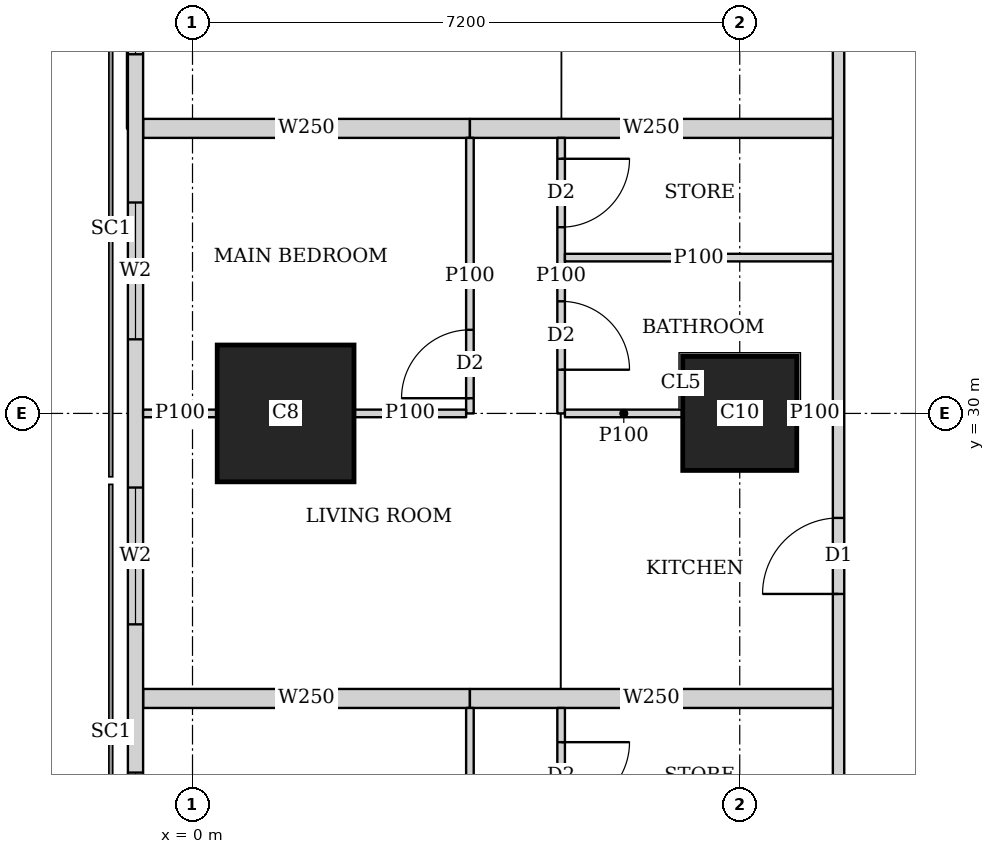
"""IFC4 building model, lengths in metres.
Left out: names, types, materials, properties, quantities, classifications, styles, units other than length and angle.
Written with IfcOpenShell. Run it as: python <this file> out.ifc"""

import sys

from ifc_helpers import new_model, si_unit, direction, frame, frame_2d, origin, origin_2d, place, context, subcontext, project, spatial, rectangle, extrude, element, fill, save


model = new_model("IFC4")
c1 = context("Model", 3, precision=1e-05, world=origin(), true_north=direction((0.0, 1.0)))
c2 = subcontext(c1, "Body", "Model", "MODEL_VIEW")
j1 = project(units=[si_unit("LENGTHUNIT", "METRE"), si_unit("PLANEANGLEUNIT", "RADIAN")], contexts=[c1])
p1 = place(None, origin())
s1 = spatial("IfcSite", under=j1, at=p1, CompositionType="ELEMENT")
p2 = place(p1, origin())
s2 = spatial("IfcBuilding", under=s1, at=p2, CompositionType="ELEMENT")
p3 = place(p2, frame((0.0, 0.0, 139.55)))
s3 = spatial("IfcBuildingStorey", under=s2, at=p3, CompositionType="ELEMENT", Elevation=139.55)
p4 = place(p3, frame((1.225, 30.0, 0.0), z_axis=(0.0, 0.0, 1.0), x_axis=(1.0, 0.0, 0.0)))
e1 = element("IfcColumn", 1, at=p4, inside=s3, PredefinedType="COLUMN", context=c2, shape_type="SweptSolid", body=[
    extrude(rectangle(XDim=1.8, YDim=1.8, at=origin_2d()), origin(), (0.0, 0.0, 1.0), 3.75),
])
p5 = place(p3, frame((7.2, 30.0, 0.0), z_axis=(0.0, 0.0, 1.0), x_axis=(1.0, 0.0, 0.0)))
e2 = element("IfcColumn", 2, at=p5, inside=s3, PredefinedType="COLUMN", context=c2, shape_type="SweptSolid", body=[
    extrude(rectangle(XDim=1.5, YDim=1.5, at=origin_2d()), origin(), (0.0, 0.0, 1.0), 3.75),
])
p6 = place(p3, frame((-0.75, 42.837, 0.0), z_axis=(0.0, 0.0, 1.0), x_axis=(0.0, -1.0, 0.0)))
e3 = element("IfcWall", 3, at=p6, inside=s3, PredefinedType="SOLIDWALL", context=c2, shape_type="SweptSolid", body=[
    extrude(rectangle(XDim=40.674, YDim=0.2, at=frame_2d((20.337, 0.0))), origin(), (0.0, 0.0, 1.0), 3.5),
])
p7 = place(p6, frame((1.78, 0.0, 0.9)))
e4 = element("IfcOpeningElement", 4, at=p7, cuts=e3, PredefinedType="OPENING", context=c2, shape_type="SweptSolid", body=[
    extrude(rectangle(XDim=1.8, YDim=1.5, at=frame_2d((0.9, 0.75))), frame((0.0, 0.11, 0.0), z_axis=(0.0, -1.0, 0.0), x_axis=(1.0, 0.0, 0.0)), (0.0, 0.0, 1.0), 0.22),
])
p8 = place(p6, frame((6.312, 0.0, 0.9)))
e5 = element("IfcOpeningElement", 5, at=p8, cuts=e3, PredefinedType="OPENING", context=c2, shape_type="SweptSolid", body=[
    extrude(rectangle(XDim=1.8, YDim=1.5, at=frame_2d((0.9, 0.75))), frame((0.0, 0.11, 0.0), z_axis=(0.0, -1.0, 0.0), x_axis=(1.0, 0.0, 0.0)), (0.0, 0.0, 1.0), 0.22),
])
p9 = place(p6, frame((10.062, 0.0, 0.9)))
e6 = element("IfcOpeningElement", 6, at=p9, cuts=e3, PredefinedType="OPENING", context=c2, shape_type="SweptSolid", body=[
    extrude(rectangle(XDim=1.8, YDim=1.5, at=frame_2d((0.9, 0.75))), frame((0.0, 0.11, 0.0), z_axis=(0.0, -1.0, 0.0), x_axis=(1.0, 0.0, 0.0)), (0.0, 0.0, 1.0), 0.22),
])
p10 = place(p6, frame((13.812, 0.0, 0.9)))
e7 = element("IfcOpeningElement", 7, at=p10, cuts=e3, PredefinedType="OPENING", context=c2, shape_type="SweptSolid", body=[
    extrude(rectangle(XDim=1.8, YDim=1.5, at=frame_2d((0.9, 0.75))), frame((0.0, 0.11, 0.0), z_axis=(0.0, -1.0, 0.0), x_axis=(1.0, 0.0, 0.0)), (0.0, 0.0, 1.0), 0.22),
])
p11 = place(p6, frame((17.562, 0.0, 0.9)))
e8 = element("IfcOpeningElement", 8, at=p11, cuts=e3, PredefinedType="OPENING", context=c2, shape_type="SweptSolid", body=[
    extrude(rectangle(XDim=1.8, YDim=1.5, at=frame_2d((0.9, 0.75))), frame((0.0, 0.11, 0.0), z_axis=(0.0, -1.0, 0.0), x_axis=(1.0, 0.0, 0.0)), (0.0, 0.0, 1.0), 0.22),
])
p12 = place(p6, frame((21.312, 0.0, 0.9)))
e9 = element("IfcOpeningElement", 9, at=p12, cuts=e3, PredefinedType="OPENING", context=c2, shape_type="SweptSolid", body=[
    extrude(rectangle(XDim=1.8, YDim=1.5, at=frame_2d((0.9, 0.75))), frame((0.0, 0.11, 0.0), z_axis=(0.0, -1.0, 0.0), x_axis=(1.0, 0.0, 0.0)), (0.0, 0.0, 1.0), 0.22),
])
p13 = place(p6, frame((25.062, 0.0, 0.9)))
e10 = element("IfcOpeningElement", 10, at=p13, cuts=e3, PredefinedType="OPENING", context=c2, shape_type="SweptSolid", body=[
    extrude(rectangle(XDim=1.8, YDim=1.5, at=frame_2d((0.9, 0.75))), frame((0.0, 0.11, 0.0), z_axis=(0.0, -1.0, 0.0), x_axis=(1.0, 0.0, 0.0)), (0.0, 0.0, 1.0), 0.22),
])
p14 = place(p6, frame((28.812, 0.0, 0.9)))
e11 = element("IfcOpeningElement", 11, at=p14, cuts=e3, PredefinedType="OPENING", context=c2, shape_type="SweptSolid", body=[
    extrude(rectangle(XDim=1.8, YDim=1.5, at=frame_2d((0.9, 0.75))), frame((0.0, 0.11, 0.0), z_axis=(0.0, -1.0, 0.0), x_axis=(1.0, 0.0, 0.0)), (0.0, 0.0, 1.0), 0.22),
])
p15 = place(p6, frame((32.562, 0.0, 0.9)))
e12 = element("IfcOpeningElement", 12, at=p15, cuts=e3, PredefinedType="OPENING", context=c2, shape_type="SweptSolid", body=[
    extrude(rectangle(XDim=1.8, YDim=1.5, at=frame_2d((0.9, 0.75))), frame((0.0, 0.11, 0.0), z_axis=(0.0, -1.0, 0.0), x_axis=(1.0, 0.0, 0.0)), (0.0, 0.0, 1.0), 0.22),
])
p16 = place(p6, frame((37.094, 0.0, 0.9)))
e13 = element("IfcOpeningElement", 13, at=p16, cuts=e3, PredefinedType="OPENING", context=c2, shape_type="SweptSolid", body=[
    extrude(rectangle(XDim=1.8, YDim=1.5, at=frame_2d((0.9, 0.75))), frame((0.0, 0.11, 0.0), z_axis=(0.0, -1.0, 0.0), x_axis=(1.0, 0.0, 0.0)), (0.0, 0.0, 1.0), 0.22),
])
p17 = place(p3, frame((8.5, 1.964, 0.0), z_axis=(0.0, 0.0, 1.0), x_axis=(0.0, 1.0, 0.0)))
e14 = element("IfcWall", 14, at=p17, inside=s3, PredefinedType="SOLIDWALL", context=c2, shape_type="SweptSolid", body=[
    extrude(rectangle(XDim=41.097, YDim=0.15, at=frame_2d((20.548, 0.0))), origin(), (0.0, 0.0, 1.0), 3.5),
])
p18 = place(p17, frame((6.911, 0.0, 0.0)))
e15 = element("IfcOpeningElement", 15, at=p18, cuts=e14, PredefinedType="OPENING", context=c2, shape_type="SweptSolid", body=[
    extrude(rectangle(XDim=1.0, YDim=2.1, at=frame_2d((0.5, 1.05))), frame((0.0, 0.085, 0.0), z_axis=(0.0, -1.0, 0.0), x_axis=(1.0, 0.0, 0.0)), (0.0, 0.0, 1.0), 0.17),
])
p19 = place(p17, frame((10.661, 0.0, 0.0)))
e16 = element("IfcOpeningElement", 16, at=p19, cuts=e14, PredefinedType="OPENING", context=c2, shape_type="SweptSolid", body=[
    extrude(rectangle(XDim=1.0, YDim=2.1, at=frame_2d((0.5, 1.05))), frame((0.0, 0.085, 0.0), z_axis=(0.0, -1.0, 0.0), x_axis=(1.0, 0.0, 0.0)), (0.0, 0.0, 1.0), 0.17),
])
p20 = place(p17, frame((25.661, 0.0, 0.0)))
e17 = element("IfcOpeningElement", 17, at=p20, cuts=e14, PredefinedType="OPENING", context=c2, shape_type="SweptSolid", body=[
    extrude(rectangle(XDim=1.0, YDim=2.1, at=frame_2d((0.5, 1.05))), frame((0.0, 0.085, 0.0), z_axis=(0.0, -1.0, 0.0), x_axis=(1.0, 0.0, 0.0)), (0.0, 0.0, 1.0), 0.17),
])
p21 = place(p17, frame((33.161, 0.0, 0.0)))
e18 = element("IfcOpeningElement", 18, at=p21, cuts=e14, PredefinedType="OPENING", context=c2, shape_type="SweptSolid", body=[
    extrude(rectangle(XDim=1.0, YDim=2.1, at=frame_2d((0.5, 1.05))), frame((0.0, 0.085, 0.0), z_axis=(0.0, -1.0, 0.0), x_axis=(1.0, 0.0, 0.0)), (0.0, 0.0, 1.0), 0.17),
])
p22 = place(p3, frame((3.65, 15.0, 0.0), z_axis=(0.0, 0.0, 1.0), x_axis=(0.0, 1.0, 0.0)))
e19 = element("IfcWall", 19, at=p22, inside=s3, PredefinedType="PARTITIONING", context=c2, shape_type="SweptSolid", body=[
    extrude(rectangle(XDim=11.125, YDim=0.1, at=frame_2d((5.562, 0.0))), origin(), (0.0, 0.0, 1.0), 3.5),
])
p23 = place(p22, frame((0.2, 0.0, 0.0)))
e20 = element("IfcOpeningElement", 20, at=p23, cuts=e19, PredefinedType="OPENING", context=c2, shape_type="SweptSolid", body=[
    extrude(rectangle(XDim=0.9, YDim=2.1, at=frame_2d((0.45, 1.05))), frame((0.0, 0.06, 0.0), z_axis=(0.0, -1.0, 0.0), x_axis=(1.0, 0.0, 0.0)), (0.0, 0.0, 1.0), 0.12),
])
p24 = place(p22, frame((3.95, 0.0, 0.0)))
e21 = element("IfcOpeningElement", 21, at=p24, cuts=e19, PredefinedType="OPENING", context=c2, shape_type="SweptSolid", body=[
    extrude(rectangle(XDim=0.9, YDim=2.1, at=frame_2d((0.45, 1.05))), frame((0.0, 0.06, 0.0), z_axis=(0.0, -1.0, 0.0), x_axis=(1.0, 0.0, 0.0)), (0.0, 0.0, 1.0), 0.12),
])
p25 = place(p22, frame((7.7, 0.0, 0.0)))
e22 = element("IfcOpeningElement", 22, at=p25, cuts=e19, PredefinedType="OPENING", context=c2, shape_type="SweptSolid", body=[
    extrude(rectangle(XDim=0.9, YDim=2.1, at=frame_2d((0.45, 1.05))), frame((0.0, 0.06, 0.0), z_axis=(0.0, -1.0, 0.0), x_axis=(1.0, 0.0, 0.0)), (0.0, 0.0, 1.0), 0.12),
])
p26 = place(p3, frame((4.85, 15.0, 0.0), z_axis=(0.0, 0.0, 1.0), x_axis=(0.0, 1.0, 0.0)))
e23 = element("IfcWall", 23, at=p26, inside=s3, PredefinedType="PARTITIONING", context=c2, shape_type="SweptSolid", body=[
    extrude(rectangle(XDim=11.125, YDim=0.1, at=frame_2d((5.562, 0.0))), origin(), (0.0, 0.0, 1.0), 3.5),
])
p27 = place(p26, frame((0.575, 0.0, 0.0)))
e24 = element("IfcOpeningElement", 24, at=p27, cuts=e23, PredefinedType="OPENING", context=c2, shape_type="SweptSolid", body=[
    extrude(rectangle(XDim=0.9, YDim=2.1, at=frame_2d((0.45, 1.05))), frame((0.0, 0.06, 0.0), z_axis=(0.0, -1.0, 0.0), x_axis=(1.0, 0.0, 0.0)), (0.0, 0.0, 1.0), 0.12),
])
p28 = place(p26, frame((4.1, 0.0, 0.0)))
e25 = element("IfcOpeningElement", 25, at=p28, cuts=e23, PredefinedType="OPENING", context=c2, shape_type="SweptSolid", body=[
    extrude(rectangle(XDim=0.9, YDim=2.1, at=frame_2d((0.45, 1.05))), frame((0.0, 0.06, 0.0), z_axis=(0.0, -1.0, 0.0), x_axis=(1.0, 0.0, 0.0)), (0.0, 0.0, 1.0), 0.12),
])
p29 = place(p26, frame((7.9, 0.0, 0.0)))
e26 = element("IfcOpeningElement", 26, at=p29, cuts=e23, PredefinedType="OPENING", context=c2, shape_type="SweptSolid", body=[
    extrude(rectangle(XDim=0.9, YDim=2.1, at=frame_2d((0.45, 1.05))), frame((0.0, 0.06, 0.0), z_axis=(0.0, -1.0, 0.0), x_axis=(1.0, 0.0, 0.0)), (0.0, 0.0, 1.0), 0.12),
])
p30 = place(p26, frame((2.45, 0.0, 0.0)))
e27 = element("IfcOpeningElement", 27, at=p30, cuts=e23, PredefinedType="OPENING", context=c2, shape_type="SweptSolid", body=[
    extrude(rectangle(XDim=0.9, YDim=2.1, at=frame_2d((0.45, 1.05))), frame((0.0, 0.06, 0.0), z_axis=(0.0, -1.0, 0.0), x_axis=(1.0, 0.0, 0.0)), (0.0, 0.0, 1.0), 0.12),
])
p31 = place(p26, frame((5.975, 0.0, 0.0)))
e28 = element("IfcOpeningElement", 28, at=p31, cuts=e23, PredefinedType="OPENING", context=c2, shape_type="SweptSolid", body=[
    extrude(rectangle(XDim=0.9, YDim=2.1, at=frame_2d((0.45, 1.05))), frame((0.0, 0.06, 0.0), z_axis=(0.0, -1.0, 0.0), x_axis=(1.0, 0.0, 0.0)), (0.0, 0.0, 1.0), 0.12),
])
p32 = place(p26, frame((9.775, 0.0, 0.0)))
e29 = element("IfcOpeningElement", 29, at=p32, cuts=e23, PredefinedType="OPENING", context=c2, shape_type="SweptSolid", body=[
    extrude(rectangle(XDim=0.9, YDim=2.1, at=frame_2d((0.45, 1.05))), frame((0.0, 0.06, 0.0), z_axis=(0.0, -1.0, 0.0), x_axis=(1.0, 0.0, 0.0)), (0.0, 0.0, 1.0), 0.12),
])
p33 = place(p3, frame((3.65, 30.0, 0.0), z_axis=(0.0, 0.0, 1.0), x_axis=(0.0, 1.0, 0.0)))
e30 = element("IfcWall", 30, at=p33, inside=s3, PredefinedType="PARTITIONING", context=c2, shape_type="SweptSolid", body=[
    extrude(rectangle(XDim=3.625, YDim=0.1, at=frame_2d((1.812, 0.0))), origin(), (0.0, 0.0, 1.0), 3.5),
])
p34 = place(p33, frame((0.2, 0.0, 0.0)))
e31 = element("IfcOpeningElement", 31, at=p34, cuts=e30, PredefinedType="OPENING", context=c2, shape_type="SweptSolid", body=[
    extrude(rectangle(XDim=0.9, YDim=2.1, at=frame_2d((0.45, 1.05))), frame((0.0, 0.06, 0.0), z_axis=(0.0, -1.0, 0.0), x_axis=(1.0, 0.0, 0.0)), (0.0, 0.0, 1.0), 0.12),
])
p35 = place(p3, frame((4.85, 30.0, 0.0), z_axis=(0.0, 0.0, 1.0), x_axis=(0.0, 1.0, 0.0)))
e32 = element("IfcWall", 32, at=p35, inside=s3, PredefinedType="PARTITIONING", context=c2, shape_type="SweptSolid", body=[
    extrude(rectangle(XDim=3.625, YDim=0.1, at=frame_2d((1.812, 0.0))), origin(), (0.0, 0.0, 1.0), 3.5),
])
p36 = place(p35, frame((0.575, 0.0, 0.0)))
e33 = element("IfcOpeningElement", 33, at=p36, cuts=e32, PredefinedType="OPENING", context=c2, shape_type="SweptSolid", body=[
    extrude(rectangle(XDim=0.9, YDim=2.1, at=frame_2d((0.45, 1.05))), frame((0.0, 0.06, 0.0), z_axis=(0.0, -1.0, 0.0), x_axis=(1.0, 0.0, 0.0)), (0.0, 0.0, 1.0), 0.12),
])
p37 = place(p35, frame((2.45, 0.0, 0.0)))
e34 = element("IfcOpeningElement", 34, at=p37, cuts=e32, PredefinedType="OPENING", context=c2, shape_type="SweptSolid", body=[
    extrude(rectangle(XDim=0.9, YDim=2.1, at=frame_2d((0.45, 1.05))), frame((0.0, 0.06, 0.0), z_axis=(0.0, -1.0, 0.0), x_axis=(1.0, 0.0, 0.0)), (0.0, 0.0, 1.0), 0.12),
])
p38 = place(p3, frame((-0.65, 30.0, 0.0), z_axis=(0.0, 0.0, 1.0), x_axis=(1.0, 0.0, 0.0)))
e35 = element("IfcWall", 35, at=p38, inside=s3, PredefinedType="PARTITIONING", context=c2, shape_type="SweptSolid", body=[
    extrude(rectangle(XDim=0.974, YDim=0.1, at=frame_2d((0.487, 0.0))), origin(), (0.0, 0.0, 1.0), 3.5),
])
p39 = place(p3, frame((2.126, 30.0, 0.0), z_axis=(0.0, 0.0, 1.0), x_axis=(1.0, 0.0, 0.0)))
e36 = element("IfcWall", 36, at=p39, inside=s3, PredefinedType="PARTITIONING", context=c2, shape_type="SweptSolid", body=[
    extrude(rectangle(XDim=1.474, YDim=0.1, at=frame_2d((0.737, 0.0))), origin(), (0.0, 0.0, 1.0), 3.5),
])
p40 = place(p3, frame((4.9, 30.0, 0.0), z_axis=(0.0, 0.0, 1.0), x_axis=(1.0, 0.0, 0.0)))
e37 = element("IfcWall", 37, at=p40, inside=s3, PredefinedType="PARTITIONING", context=c2, shape_type="SweptSolid", body=[
    extrude(rectangle(XDim=1.549, YDim=0.1, at=frame_2d((0.774, 0.0))), origin(), (0.0, 0.0, 1.0), 3.5),
])
p41 = place(p3, frame((7.951, 30.0, 0.0), z_axis=(0.0, 0.0, 1.0), x_axis=(1.0, 0.0, 0.0)))
e38 = element("IfcWall", 38, at=p41, inside=s3, PredefinedType="PARTITIONING", context=c2, shape_type="SweptSolid", body=[
    extrude(rectangle(XDim=0.474, YDim=0.1, at=frame_2d((0.237, 0.0))), origin(), (0.0, 0.0, 1.0), 3.5),
])
p42 = place(p3, frame((4.9, 32.05, 0.0), z_axis=(0.0, 0.0, 1.0), x_axis=(1.0, 0.0, 0.0)))
e39 = element("IfcWall", 39, at=p42, inside=s3, PredefinedType="PARTITIONING", context=c2, shape_type="SweptSolid", body=[
    extrude(rectangle(XDim=3.525, YDim=0.1, at=frame_2d((1.763, 0.0))), origin(), (0.0, 0.0, 1.0), 3.5),
])
p43 = place(p3, frame((-0.65, 26.25, 0.0), z_axis=(0.0, 0.0, 1.0), x_axis=(1.0, 0.0, 0.0)))
e40 = element("IfcWall", 40, at=p43, inside=s3, PredefinedType="SOLIDWALL", context=c2, shape_type="SweptSolid", body=[
    extrude(rectangle(XDim=4.3, YDim=0.25, at=frame_2d((2.15, 0.0))), origin(), (0.0, 0.0, 1.0), 2.1),
])
p44 = place(p3, frame((3.65, 26.25, 0.0), z_axis=(0.0, 0.0, 1.0), x_axis=(1.0, 0.0, 0.0)))
e41 = element("IfcWall", 41, at=p44, inside=s3, PredefinedType="SOLIDWALL", context=c2, shape_type="SweptSolid", body=[
    extrude(rectangle(XDim=4.775, YDim=0.25, at=frame_2d((2.388, 0.0))), origin(), (0.0, 0.0, 1.0), 3.5),
])
p45 = place(p3, frame((-0.65, 33.75, 0.0), z_axis=(0.0, 0.0, 1.0), x_axis=(1.0, 0.0, 0.0)))
e42 = element("IfcWall", 42, at=p45, inside=s3, PredefinedType="SOLIDWALL", context=c2, shape_type="SweptSolid", body=[
    extrude(rectangle(XDim=4.3, YDim=0.25, at=frame_2d((2.15, 0.0))), origin(), (0.0, 0.0, 1.0), 2.1),
])
p46 = place(p3, frame((3.65, 33.75, 0.0), z_axis=(0.0, 0.0, 1.0), x_axis=(1.0, 0.0, 0.0)))
e43 = element("IfcWall", 43, at=p46, inside=s3, PredefinedType="SOLIDWALL", context=c2, shape_type="SweptSolid", body=[
    extrude(rectangle(XDim=4.775, YDim=0.25, at=frame_2d((2.388, 0.0))), origin(), (0.0, 0.0, 1.0), 3.5),
])
p47 = place(p8, origin())
e44 = element("IfcWindow", 44, at=p47, inside=s3, PartitioningType="SINGLE_PANEL", PredefinedType="WINDOW", context=c2, shape_type="SweptSolid", body=[
    extrude(rectangle(XDim=1.8, YDim=1.5, at=frame_2d((0.9, 0.75))), frame((0.0, 0.03, 0.0), z_axis=(0.0, -1.0, 0.0), x_axis=(1.0, 0.0, 0.0)), (0.0, 0.0, 1.0), 0.06),
])
fill(e5, e44)
p48 = place(p9, origin())
e45 = element("IfcWindow", 45, at=p48, inside=s3, PartitioningType="SINGLE_PANEL", PredefinedType="WINDOW", context=c2, shape_type="SweptSolid", body=[
    extrude(rectangle(XDim=1.8, YDim=1.5, at=frame_2d((0.9, 0.75))), frame((0.0, 0.03, 0.0), z_axis=(0.0, -1.0, 0.0), x_axis=(1.0, 0.0, 0.0)), (0.0, 0.0, 1.0), 0.06),
])
fill(e6, e45)
p49 = place(p10, origin())
e46 = element("IfcWindow", 46, at=p49, inside=s3, PartitioningType="SINGLE_PANEL", PredefinedType="WINDOW", context=c2, shape_type="SweptSolid", body=[
    extrude(rectangle(XDim=1.8, YDim=1.5, at=frame_2d((0.9, 0.75))), frame((0.0, 0.03, 0.0), z_axis=(0.0, -1.0, 0.0), x_axis=(1.0, 0.0, 0.0)), (0.0, 0.0, 1.0), 0.06),
])
fill(e7, e46)
p50 = place(p11, origin())
e47 = element("IfcWindow", 47, at=p50, inside=s3, PartitioningType="SINGLE_PANEL", PredefinedType="WINDOW", context=c2, shape_type="SweptSolid", body=[
    extrude(rectangle(XDim=1.8, YDim=1.5, at=frame_2d((0.9, 0.75))), frame((0.0, 0.03, 0.0), z_axis=(0.0, -1.0, 0.0), x_axis=(1.0, 0.0, 0.0)), (0.0, 0.0, 1.0), 0.06),
])
fill(e8, e47)
p51 = place(p32, origin())
e48 = element("IfcDoor", 48, at=p51, inside=s3, OperationType="SINGLE_SWING_LEFT", PredefinedType="DOOR", context=c2, shape_type="SweptSolid", body=[
    extrude(rectangle(XDim=0.9, YDim=2.1, at=frame_2d((0.45, 1.05))), frame((0.0, 0.025, 0.0), z_axis=(0.0, -1.0, 0.0), x_axis=(1.0, 0.0, 0.0)), (0.0, 0.0, 1.0), 0.05),
])
fill(e29, e48)
p52 = place(p34, origin())
e49 = element("IfcDoor", 49, at=p52, inside=s3, OperationType="SINGLE_SWING_LEFT", PredefinedType="DOOR", context=c2, shape_type="SweptSolid", body=[
    extrude(rectangle(XDim=0.9, YDim=2.1, at=frame_2d((0.45, 1.05))), frame((0.0, 0.025, 0.0), z_axis=(0.0, -1.0, 0.0), x_axis=(1.0, 0.0, 0.0)), (0.0, 0.0, 1.0), 0.05),
])
fill(e31, e49)
p53 = place(p36, origin())
e50 = element("IfcDoor", 50, at=p53, inside=s3, OperationType="SINGLE_SWING_RIGHT", PredefinedType="DOOR", context=c2, shape_type="SweptSolid", body=[
    extrude(rectangle(XDim=0.9, YDim=2.1, at=frame_2d((0.45, 1.05))), frame((0.0, 0.025, 0.0), z_axis=(0.0, -1.0, 0.0), x_axis=(1.0, 0.0, 0.0)), (0.0, 0.0, 1.0), 0.05),
])
fill(e33, e50)
p54 = place(p37, origin())
e51 = element("IfcDoor", 51, at=p54, inside=s3, OperationType="SINGLE_SWING_LEFT", PredefinedType="DOOR", context=c2, shape_type="SweptSolid", body=[
    extrude(rectangle(XDim=0.9, YDim=2.1, at=frame_2d((0.45, 1.05))), frame((0.0, 0.025, 0.0), z_axis=(0.0, -1.0, 0.0), x_axis=(1.0, 0.0, 0.0)), (0.0, 0.0, 1.0), 0.05),
])
fill(e34, e51)
p55 = place(p20, origin())
e52 = element("IfcDoor", 52, at=p55, inside=s3, OperationType="SINGLE_SWING_LEFT", PredefinedType="DOOR", context=c2, shape_type="SweptSolid", body=[
    extrude(rectangle(XDim=1.0, YDim=2.1, at=frame_2d((0.5, 1.05))), frame((0.0, 0.025, 0.0), z_axis=(0.0, -1.0, 0.0), x_axis=(1.0, 0.0, 0.0)), (0.0, 0.0, 1.0), 0.05),
])
fill(e17, e52)
save(model, sys.argv[1])
